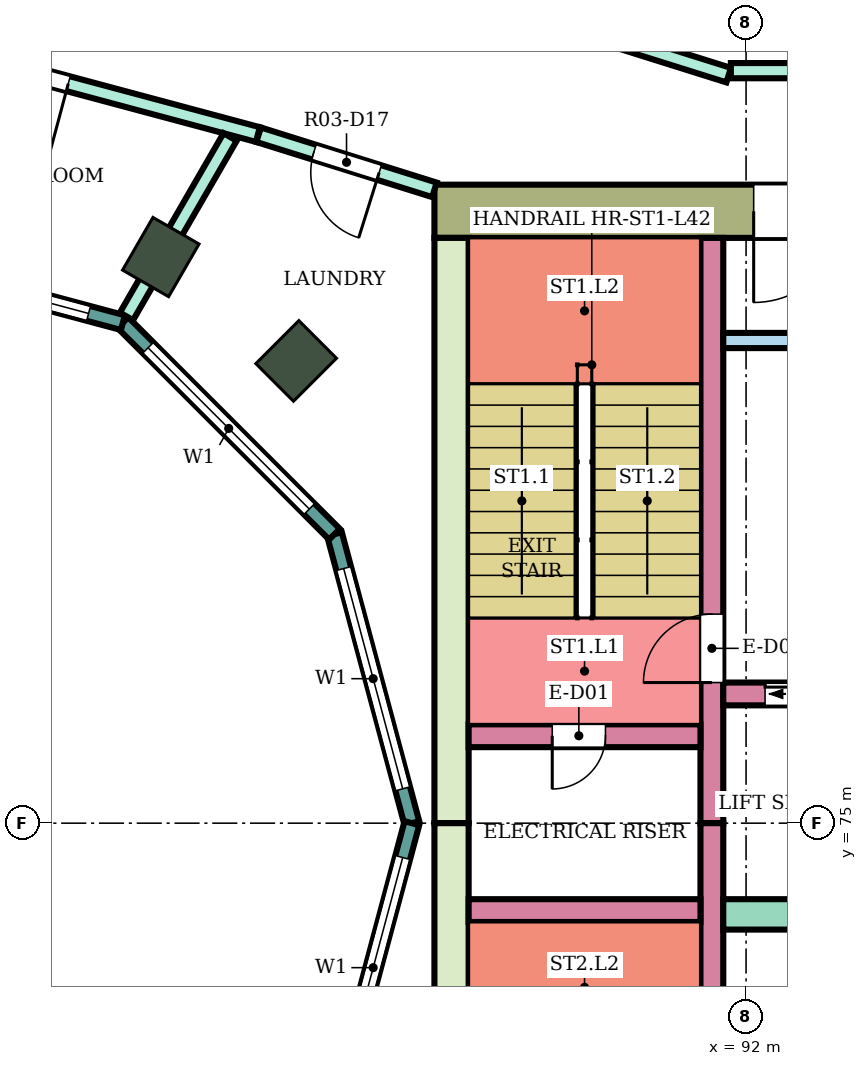
"""IFC4 building model, lengths in metres.
Left out: names, types, materials, properties, quantities, classifications, styles, units other than length and angle.
Written with IfcOpenShell. Run it as: python <this file> out.ifc"""

import sys

from ifc_helpers import new_model, si_unit, direction, frame, frame_2d, origin, origin_2d, place, context, subcontext, project, spatial, rectangle, extrude, element, fill, save


model = new_model("IFC4")
c1 = context("Model", 3, precision=1e-05, world=origin(), true_north=direction((0.0, 1.0)))
c2 = subcontext(c1, "Body", "Model", "MODEL_VIEW")
j1 = project(units=[si_unit("LENGTHUNIT", "METRE"), si_unit("PLANEANGLEUNIT", "RADIAN")], contexts=[c1])
p1 = place(None, origin())
s1 = spatial("IfcSite", under=j1, at=p1, CompositionType="ELEMENT")
p2 = place(p1, origin())
s2 = spatial("IfcBuilding", under=s1, at=p2, CompositionType="ELEMENT")
p3 = place(p2, frame((0.0, 0.0, 182.3)))
s3 = spatial("IfcBuildingStorey", under=s2, at=p3, CompositionType="ELEMENT", Elevation=182.3)
for number, where, z_axis, x_axis in (
    (1, (86.081, 81.081, 0.0), (0.0, 0.0, 1.0), (0.707, 0.707, 0.0)),
    (2, (84.3, 82.448, 0.0), (0.0, 0.0, 1.0), (0.5, 0.866, 0.0)),
):
    element("IfcColumn", number, at=place(p3, frame(where, z_axis=z_axis, x_axis=x_axis)), inside=s3, PredefinedType="COLUMN", context=c2, shape_type="SweptSolid", body=[
        extrude(rectangle(XDim=0.8, YDim=0.7, at=origin_2d()), origin(), (0.0, 0.0, 1.0), 4.1),
    ])
p4 = place(p3, frame((87.9, 83.05, 0.0), z_axis=(0.0, 0.0, 1.0), x_axis=(1.0, 0.0, 0.0)))
e3 = element("IfcWall", 3, at=p4, inside=s3, PredefinedType="SHEAR", context=c2, shape_type="SweptSolid", body=[
    extrude(rectangle(XDim=14.8, YDim=0.7, at=frame_2d((7.4, 0.0))), origin(), (0.0, 0.0, 1.0), 3.78),
])
p5 = place(p4, frame((4.2, 0.0, 0.0)))
e4 = element("IfcOpeningElement", 4, at=p5, cuts=e3, PredefinedType="OPENING", context=c2, shape_type="SweptSolid", body=[
    extrude(rectangle(XDim=2.4, YDim=2.4, at=frame_2d((1.2, 1.2))), frame((0.0, 0.36, 0.0), z_axis=(0.0, -1.0, 0.0), x_axis=(1.0, 0.0, 0.0)), (0.0, 0.0, 1.0), 0.72),
])
for number, where, z_axis, x_axis in (
    (5, (88.125, 75.0, 0.0), (0.0, 0.0, 1.0), (0.0, 1.0, 0.0)),
    (6, (88.125, 67.3, 0.0), (0.0, 0.0, 1.0), (0.0, 1.0, 0.0)),
):
    element("IfcWall", number, at=place(p3, frame(where, z_axis=z_axis, x_axis=x_axis)), inside=s3, PredefinedType="SHEAR", context=c2, shape_type="SweptSolid", body=[
        extrude(rectangle(XDim=7.7, YDim=0.45, at=frame_2d((3.85, 0.0))), origin(), (0.0, 0.0, 1.0), 3.78),
    ])
p6 = place(p3, frame((91.55, 75.0, 0.0), z_axis=(0.0, 0.0, 1.0), x_axis=(0.0, 1.0, 0.0)))
e7 = element("IfcWall", 7, at=p6, inside=s3, PredefinedType="SHEAR", context=c2, shape_type="SweptSolid", body=[
    extrude(rectangle(XDim=7.7, YDim=0.3, at=frame_2d((3.85, 0.0))), origin(), (0.0, 0.0, 1.0), 3.78),
])
p7 = place(p6, frame((1.85, 0.0, 0.0)))
e8 = element("IfcOpeningElement", 8, at=p7, cuts=e7, PredefinedType="OPENING", context=c2, shape_type="SweptSolid", body=[
    extrude(rectangle(XDim=0.9, YDim=2.1, at=frame_2d((0.45, 1.05))), frame((0.0, 0.16, 0.0), z_axis=(0.0, -1.0, 0.0), x_axis=(1.0, 0.0, 0.0)), (0.0, 0.0, 1.0), 0.32),
])
p8 = place(p3, frame((91.55, 67.3, 0.0), z_axis=(0.0, 0.0, 1.0), x_axis=(0.0, 1.0, 0.0)))
e9 = element("IfcWall", 9, at=p8, inside=s3, PredefinedType="SHEAR", context=c2, shape_type="SweptSolid", body=[
    extrude(rectangle(XDim=7.7, YDim=0.3, at=frame_2d((3.85, 0.0))), origin(), (0.0, 0.0, 1.0), 3.78),
])
p9 = place(p8, frame((0.35, 0.0, 0.0)))
e10 = element("IfcOpeningElement", 10, at=p9, cuts=e9, PredefinedType="OPENING", context=c2, shape_type="SweptSolid", body=[
    extrude(rectangle(XDim=0.9, YDim=2.1, at=frame_2d((0.45, 1.05))), frame((0.0, 0.16, 0.0), z_axis=(0.0, -1.0, 0.0), x_axis=(1.0, 0.0, 0.0)), (0.0, 0.0, 1.0), 0.32),
])
p10 = place(p3, frame((88.35, 76.15, 0.0), z_axis=(0.0, 0.0, 1.0), x_axis=(1.0, 0.0, 0.0)))
e11 = element("IfcWall", 11, at=p10, inside=s3, PredefinedType="SHEAR", context=c2, shape_type="SweptSolid", body=[
    extrude(rectangle(XDim=3.05, YDim=0.3, at=frame_2d((1.525, 0.0))), origin(), (0.0, 0.0, 1.0), 3.78),
])
p11 = place(p10, frame((1.1, 0.0, 0.0)))
e12 = element("IfcOpeningElement", 12, at=p11, cuts=e11, PredefinedType="OPENING", context=c2, shape_type="SweptSolid", body=[
    extrude(rectangle(XDim=0.7, YDim=2.0, at=frame_2d((0.35, 1.0))), frame((0.0, 0.16, 0.0), z_axis=(0.0, -1.0, 0.0), x_axis=(1.0, 0.0, 0.0)), (0.0, 0.0, 1.0), 0.32),
])
p12 = place(p3, frame((88.35, 73.85, 0.0), z_axis=(0.0, 0.0, 1.0), x_axis=(1.0, 0.0, 0.0)))
e13 = element("IfcWall", 13, at=p12, inside=s3, PredefinedType="SHEAR", context=c2, shape_type="SweptSolid", body=[
    extrude(rectangle(XDim=3.05, YDim=0.3, at=frame_2d((1.525, 0.0))), origin(), (0.0, 0.0, 1.0), 3.78),
])
p13 = place(p3, frame((91.7, 76.7, 0.0), z_axis=(0.0, 0.0, 1.0), x_axis=(1.0, 0.0, 0.0)))
e14 = element("IfcWall", 14, at=p13, inside=s3, PredefinedType="SHEAR", context=c2, shape_type="SweptSolid", body=[
    extrude(rectangle(XDim=11.0, YDim=0.3, at=frame_2d((5.5, 0.0))), origin(), (0.0, 0.0, 1.0), 3.78),
])
p14 = place(p13, frame((0.55, 0.0, 0.0)))
e15 = element("IfcOpeningElement", 15, at=p14, cuts=e14, PredefinedType="OPENING", context=c2, shape_type="SweptSolid", body=[
    extrude(rectangle(XDim=1.1, YDim=2.1, at=frame_2d((0.55, 1.05))), frame((0.0, 0.16, 0.0), z_axis=(0.0, -1.0, 0.0), x_axis=(1.0, 0.0, 0.0)), (0.0, 0.0, 1.0), 0.32),
])
p15 = place(p13, frame((3.0, 0.0, 0.0)))
e16 = element("IfcOpeningElement", 16, at=p15, cuts=e14, PredefinedType="OPENING", context=c2, shape_type="SweptSolid", body=[
    extrude(rectangle(XDim=1.2, YDim=2.1, at=frame_2d((0.6, 1.05))), frame((0.0, 0.16, 0.0), z_axis=(0.0, -1.0, 0.0), x_axis=(1.0, 0.0, 0.0)), (0.0, 0.0, 1.0), 0.32),
])
p16 = place(p13, frame((5.5, 0.0, 0.0)))
e17 = element("IfcOpeningElement", 17, at=p16, cuts=e14, PredefinedType="OPENING", context=c2, shape_type="SweptSolid", body=[
    extrude(rectangle(XDim=1.2, YDim=2.1, at=frame_2d((0.6, 1.05))), frame((0.0, 0.16, 0.0), z_axis=(0.0, -1.0, 0.0), x_axis=(1.0, 0.0, 0.0)), (0.0, 0.0, 1.0), 0.32),
])
p17 = place(p13, frame((8.8, 0.0, 0.0)))
e18 = element("IfcOpeningElement", 18, at=p17, cuts=e14, PredefinedType="OPENING", context=c2, shape_type="SweptSolid", body=[
    extrude(rectangle(XDim=0.9, YDim=2.1, at=frame_2d((0.45, 1.05))), frame((0.0, 0.16, 0.0), z_axis=(0.0, -1.0, 0.0), x_axis=(1.0, 0.0, 0.0)), (0.0, 0.0, 1.0), 0.32),
])
p18 = place(p3, frame((91.7, 73.8, 0.0), z_axis=(0.0, 0.0, 1.0), x_axis=(1.0, 0.0, 0.0)))
e19 = element("IfcWall", 19, at=p18, inside=s3, PredefinedType="SHEAR", context=c2, shape_type="SweptSolid", body=[
    extrude(rectangle(XDim=11.0, YDim=0.4, at=frame_2d((5.5, 0.0))), origin(), (0.0, 0.0, 1.0), 3.78),
])
p19 = place(p3, frame((91.7, 81.35, 0.0), z_axis=(0.0, 0.0, 1.0), x_axis=(1.0, 0.0, 0.0)))
e20 = element("IfcWall", 20, at=p19, inside=s3, PredefinedType="SHEAR", context=c2, shape_type="SweptSolid", body=[
    extrude(rectangle(XDim=4.5, YDim=0.2, at=frame_2d((2.25, 0.0))), origin(), (0.0, 0.0, 1.0), 3.78),
])
p20 = place(p3, frame((87.604, 75.0, 0.0), z_axis=(0.0, 0.0, 1.0), x_axis=(-0.258789828301, 0.965933654434, 0.0)))
e21 = element("IfcWall", 21, at=p20, inside=s3, PredefinedType="NOTDEFINED", context=c2, shape_type="SweptSolid", body=[
    extrude(rectangle(XDim=3.936, YDim=0.2, at=frame_2d((1.968, 0.0))), origin(), (0.0, 0.0, 1.0), 4.1),
])
p21 = place(p20, frame((0.468, 0.0, 0.9)))
e22 = element("IfcOpeningElement", 22, at=p21, cuts=e21, PredefinedType="OPENING", context=c2, shape_type="SweptSolid", body=[
    extrude(rectangle(XDim=3.0, YDim=2.3, at=frame_2d((1.5, 1.15))), frame((0.0, 0.11, 0.0), z_axis=(0.0, -1.0, 0.0), x_axis=(1.0, 0.0, 0.0)), (0.0, 0.0, 1.0), 0.22),
])
p22 = place(p3, frame((86.585, 78.802, 0.0), z_axis=(0.0, 0.0, 1.0), x_axis=(-0.707106781187, 0.707106781187, 0.0)))
e23 = element("IfcWall", 23, at=p22, inside=s3, PredefinedType="NOTDEFINED", context=c2, shape_type="SweptSolid", body=[
    extrude(rectangle(XDim=3.936, YDim=0.2, at=frame_2d((1.968, 0.0))), origin(), (0.0, 0.0, 1.0), 4.1),
])
p23 = place(p22, frame((0.468, 0.0, 0.9)))
e24 = element("IfcOpeningElement", 24, at=p23, cuts=e23, PredefinedType="OPENING", context=c2, shape_type="SweptSolid", body=[
    extrude(rectangle(XDim=3.0, YDim=2.3, at=frame_2d((1.5, 1.15))), frame((0.0, 0.11, 0.0), z_axis=(0.0, -1.0, 0.0), x_axis=(1.0, 0.0, 0.0)), (0.0, 0.0, 1.0), 0.22),
])
p24 = place(p3, frame((83.802, 81.585, 0.0), z_axis=(0.0, 0.0, 1.0), x_axis=(-0.965933654434, 0.258789828301, 0.0)))
e25 = element("IfcWall", 25, at=p24, inside=s3, PredefinedType="NOTDEFINED", context=c2, shape_type="SweptSolid", body=[
    extrude(rectangle(XDim=3.936, YDim=0.2, at=frame_2d((1.968, 0.0))), origin(), (0.0, 0.0, 1.0), 4.1),
])
p25 = place(p24, frame((0.468, 0.0, 0.9)))
e26 = element("IfcOpeningElement", 26, at=p25, cuts=e25, PredefinedType="OPENING", context=c2, shape_type="SweptSolid", body=[
    extrude(rectangle(XDim=3.0, YDim=2.3, at=frame_2d((1.5, 1.15))), frame((0.0, 0.11, 0.0), z_axis=(0.0, -1.0, 0.0), x_axis=(1.0, 0.0, 0.0)), (0.0, 0.0, 1.0), 0.22),
])
p26 = place(p3, frame((86.585, 71.198, 0.0), z_axis=(0.0, 0.0, 1.0), x_axis=(0.258789828301, 0.965933654434, 0.0)))
e27 = element("IfcWall", 27, at=p26, inside=s3, PredefinedType="NOTDEFINED", context=c2, shape_type="SweptSolid", body=[
    extrude(rectangle(XDim=3.936, YDim=0.2, at=frame_2d((1.968, 0.0))), origin(), (0.0, 0.0, 1.0), 4.1),
])
p27 = place(p26, frame((0.468, 0.0, 0.9)))
e28 = element("IfcOpeningElement", 28, at=p27, cuts=e27, PredefinedType="OPENING", context=c2, shape_type="SweptSolid", body=[
    extrude(rectangle(XDim=3.0, YDim=2.3, at=frame_2d((1.5, 1.15))), frame((0.0, 0.11, 0.0), z_axis=(0.0, -1.0, 0.0), x_axis=(1.0, 0.0, 0.0)), (0.0, 0.0, 1.0), 0.22),
])
p28 = place(p3, frame((80.0, 85.554, 0.0), z_axis=(0.0, 0.0, 1.0), x_axis=(0.965928989968, -0.258807237802, 0.0)))
e29 = element("IfcWall", 29, at=p28, inside=s3, PredefinedType="PARTITIONING", context=c2, shape_type="SweptSolid", body=[
    extrude(rectangle(XDim=5.774, YDim=0.2, at=frame_2d((2.887, 0.0))), origin(), (0.0, 0.0, 1.0), 3.65),
])
p29 = place(p28, frame((2.292, 0.0, 0.0)))
e30 = element("IfcOpeningElement", 30, at=p29, cuts=e29, PredefinedType="OPENING", context=c2, shape_type="SweptSolid", body=[
    extrude(rectangle(XDim=0.9, YDim=2.1, at=frame_2d((0.45, 1.05))), frame((0.0, 0.11, 0.0), z_axis=(0.0, -1.0, 0.0), x_axis=(1.0, 0.0, 0.0)), (0.0, 0.0, 1.0), 0.22),
])
p30 = place(p3, frame((83.849, 81.667, 0.0), z_axis=(0.0, 0.0, 1.0), x_axis=(0.500117899823, 0.865957323588, 0.0)))
e31 = element("IfcWall", 31, at=p30, inside=s3, PredefinedType="PARTITIONING", context=c2, shape_type="SweptSolid", body=[
    extrude(rectangle(XDim=2.725, YDim=0.2, at=frame_2d((1.363, 0.0))), origin(), (0.0, 0.0, 1.0), 3.65),
])
p31 = place(p3, frame((85.587, 84.057, 0.0), z_axis=(0.0, 0.0, 1.0), x_axis=(0.954239513179, -0.299043393987, 0.0)))
e32 = element("IfcWall", 32, at=p31, inside=s3, PredefinedType="PARTITIONING", context=c2, shape_type="SweptSolid", body=[
    extrude(rectangle(XDim=2.424, YDim=0.2, at=frame_2d((1.212, 0.0))), origin(), (0.0, 0.0, 1.0), 3.65),
])
p32 = place(p31, frame((0.762, 0.0, 0.0)))
e33 = element("IfcOpeningElement", 33, at=p32, cuts=e32, PredefinedType="OPENING", context=c2, shape_type="SweptSolid", body=[
    extrude(rectangle(XDim=0.9, YDim=2.1, at=frame_2d((0.45, 1.05))), frame((0.0, 0.11, 0.0), z_axis=(0.0, -1.0, 0.0), x_axis=(1.0, 0.0, 0.0)), (0.0, 0.0, 1.0), 0.22),
])
p33 = place(p3, frame((86.313, 86.554, 0.0), z_axis=(0.0, 0.0, 1.0), x_axis=(0.954081217458, -0.299548043717, 0.0)))
e34 = element("IfcWall", 34, at=p33, inside=s3, PredefinedType="PARTITIONING", context=c2, shape_type="SweptSolid", body=[
    extrude(rectangle(XDim=5.721, YDim=0.2, at=frame_2d((2.86, 0.0))), origin(), (0.0, 0.0, 1.0), 3.65),
])
p34 = place(p3, frame((91.8, 84.9, 0.0), z_axis=(0.0, 0.0, 1.0), x_axis=(1.0, 0.0, 0.0)))
e35 = element("IfcWall", 35, at=p34, inside=s3, PredefinedType="PARTITIONING", context=c2, shape_type="SweptSolid", body=[
    extrude(rectangle(XDim=3.0, YDim=0.2, at=frame_2d((1.5, 0.0))), origin(), (0.0, 0.0, 1.0), 3.65),
])
p35 = place(p34, frame((1.45, 0.0, 0.0)))
e36 = element("IfcOpeningElement", 36, at=p35, cuts=e35, PredefinedType="OPENING", context=c2, shape_type="SweptSolid", body=[
    extrude(rectangle(XDim=1.0, YDim=2.1, at=frame_2d((0.5, 1.05))), frame((0.0, 0.11, 0.0), z_axis=(0.0, -1.0, 0.0), x_axis=(1.0, 0.0, 0.0)), (0.0, 0.0, 1.0), 0.22),
])
p36 = place(p21, origin())
e37 = element("IfcWindow", 37, at=p36, inside=s3, PartitioningType="SINGLE_PANEL", PredefinedType="WINDOW", context=c2, shape_type="SweptSolid", body=[
    extrude(rectangle(XDim=3.0, YDim=2.3, at=frame_2d((1.5, 1.15))), frame((0.0, 0.03, 0.0), z_axis=(0.0, -1.0, 0.0), x_axis=(1.0, 0.0, 0.0)), (0.0, 0.0, 1.0), 0.06),
])
fill(e22, e37)
p37 = place(p23, origin())
e38 = element("IfcWindow", 38, at=p37, inside=s3, PartitioningType="SINGLE_PANEL", PredefinedType="WINDOW", context=c2, shape_type="SweptSolid", body=[
    extrude(rectangle(XDim=3.0, YDim=2.3, at=frame_2d((1.5, 1.15))), frame((0.0, 0.03, 0.0), z_axis=(0.0, -1.0, 0.0), x_axis=(1.0, 0.0, 0.0)), (0.0, 0.0, 1.0), 0.06),
])
fill(e24, e38)
p38 = place(p25, origin())
e39 = element("IfcWindow", 39, at=p38, inside=s3, PartitioningType="SINGLE_PANEL", PredefinedType="WINDOW", context=c2, shape_type="SweptSolid", body=[
    extrude(rectangle(XDim=3.0, YDim=2.3, at=frame_2d((1.5, 1.15))), frame((0.0, 0.03, 0.0), z_axis=(0.0, -1.0, 0.0), x_axis=(1.0, 0.0, 0.0)), (0.0, 0.0, 1.0), 0.06),
])
fill(e26, e39)
p39 = place(p27, origin())
e40 = element("IfcWindow", 40, at=p39, inside=s3, PartitioningType="SINGLE_PANEL", PredefinedType="WINDOW", context=c2, shape_type="SweptSolid", body=[
    extrude(rectangle(XDim=3.0, YDim=2.3, at=frame_2d((1.5, 1.15))), frame((0.0, 0.03, 0.0), z_axis=(0.0, -1.0, 0.0), x_axis=(1.0, 0.0, 0.0)), (0.0, 0.0, 1.0), 0.06),
])
fill(e28, e40)
p40 = place(p32, frame((0.9, 0.0, 0.0), z_axis=(0.0, 0.0, 1.0), x_axis=(-1.0, 0.0, 0.0)))
e41 = element("IfcDoor", 41, at=p40, inside=s3, OperationType="SINGLE_SWING_LEFT", PredefinedType="DOOR", context=c2, shape_type="SweptSolid", body=[
    extrude(rectangle(XDim=0.9, YDim=2.1, at=frame_2d((0.45, 1.05))), frame((0.0, 0.025, 0.0), z_axis=(0.0, -1.0, 0.0), x_axis=(1.0, 0.0, 0.0)), (0.0, 0.0, 1.0), 0.05),
])
fill(e33, e41)
p41 = place(p29, frame((0.9, 0.0, 0.0), z_axis=(0.0, 0.0, 1.0), x_axis=(-1.0, 0.0, 0.0)))
e42 = element("IfcDoor", 42, at=p41, inside=s3, OperationType="SINGLE_SWING_LEFT", PredefinedType="DOOR", context=c2, shape_type="SweptSolid", body=[
    extrude(rectangle(XDim=0.9, YDim=2.1, at=frame_2d((0.45, 1.05))), frame((0.0, 0.025, 0.0), z_axis=(0.0, -1.0, 0.0), x_axis=(1.0, 0.0, 0.0)), (0.0, 0.0, 1.0), 0.05),
])
fill(e30, e42)
p42 = place(p11, frame((0.7, 0.0, 0.0), z_axis=(0.0, 0.0, 1.0), x_axis=(-1.0, 0.0, 0.0)))
e43 = element("IfcDoor", 43, at=p42, inside=s3, OperationType="SINGLE_SWING_RIGHT", PredefinedType="DOOR", context=c2, shape_type="SweptSolid", body=[
    extrude(rectangle(XDim=0.7, YDim=2.0, at=frame_2d((0.35, 1.0))), frame((0.0, 0.025, 0.0), z_axis=(0.0, -1.0, 0.0), x_axis=(1.0, 0.0, 0.0)), (0.0, 0.0, 1.0), 0.05),
])
fill(e12, e43)
p43 = place(p7, origin())
e44 = element("IfcDoor", 44, at=p43, inside=s3, OperationType="SINGLE_SWING_LEFT", PredefinedType="DOOR", context=c2, shape_type="SweptSolid", body=[
    extrude(rectangle(XDim=0.9, YDim=2.1, at=frame_2d((0.45, 1.05))), frame((0.0, 0.025, 0.0), z_axis=(0.0, -1.0, 0.0), x_axis=(1.0, 0.0, 0.0)), (0.0, 0.0, 1.0), 0.05),
])
fill(e8, e44)
p44 = place(p14, origin())
e45 = element("IfcDoor", 45, at=p44, inside=s3, OperationType="DOUBLE_DOOR_SLIDING", PredefinedType="DOOR", context=c2, shape_type="SweptSolid", body=[
    extrude(rectangle(XDim=1.1, YDim=2.1, at=frame_2d((0.55, 1.05))), frame((0.0, 0.025, 0.0), z_axis=(0.0, -1.0, 0.0), x_axis=(1.0, 0.0, 0.0)), (0.0, 0.0, 1.0), 0.05),
])
fill(e15, e45)
p45 = place(p5, frame((2.4, 0.0, 0.0), z_axis=(0.0, 0.0, 1.0), x_axis=(-1.0, 0.0, 0.0)))
e46 = element("IfcDoor", 46, at=p45, inside=s3, OperationType="DOUBLE_DOOR_SINGLE_SWING", PredefinedType="DOOR", context=c2, shape_type="SweptSolid", body=[
    extrude(rectangle(XDim=2.4, YDim=2.4, at=frame_2d((1.2, 1.2))), frame((0.0, 0.025, 0.0), z_axis=(0.0, -1.0, 0.0), x_axis=(1.0, 0.0, 0.0)), (0.0, 0.0, 1.0), 0.05),
])
fill(e4, e46)
save(model, sys.argv[1])
